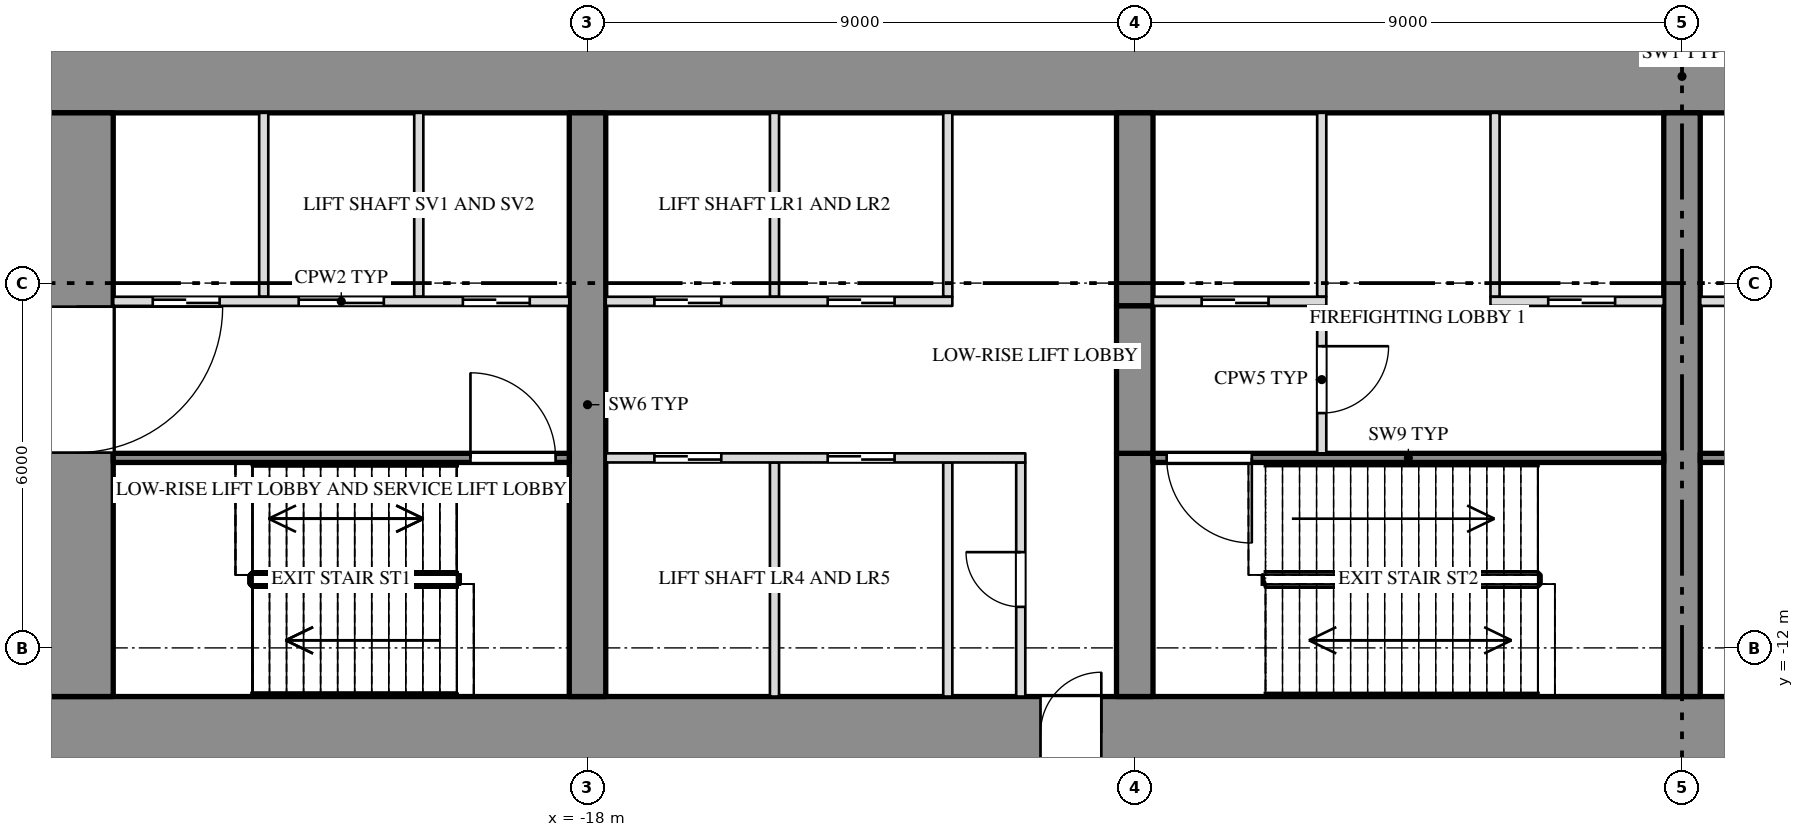
"""IFC4 building model, lengths in metres.
Left out: names, types, materials, properties, quantities, classifications, styles, units other than length and angle.
Written with IfcOpenShell. Run it as: python <this file> out.ifc"""

import sys

from ifc_helpers import new_model, si_unit, direction, frame, frame_2d, origin, place, context, subcontext, project, spatial, rectangle, extrude, element, fill, save


model = new_model("IFC4")
c1 = context("Model", 3, precision=1e-05, world=origin(), true_north=direction((0.0, 1.0)))
c2 = subcontext(c1, "Body", "Model", "MODEL_VIEW")
j1 = project(units=[si_unit("LENGTHUNIT", "METRE"), si_unit("PLANEANGLEUNIT", "RADIAN")], contexts=[c1])
p1 = place(None, origin())
s1 = spatial("IfcSite", under=j1, at=p1, CompositionType="ELEMENT")
p2 = place(p1, origin())
s2 = spatial("IfcBuilding", under=s1, at=p2, CompositionType="ELEMENT")
p3 = place(p2, frame((0.0, 0.0, 15.0)))
s3 = spatial("IfcBuildingStorey", under=s2, at=p3, CompositionType="ELEMENT", Elevation=15.0)
p4 = place(p3, frame((-27.0, -2.6, 0.0), z_axis=(0.0, 0.0, 1.0), x_axis=(1.0, 0.0, 0.0)))
e1 = element("IfcWall", 1, at=p4, inside=s3, PredefinedType="SHEAR", context=c2, shape_type="SweptSolid", body=[
    extrude(rectangle(XDim=54.0, YDim=1.2, at=frame_2d((27.0, 0.0))), origin(), (0.0, 0.0, 1.0), 5.7),
])
p5 = place(p3, frame((-27.0, -13.4, 0.0), z_axis=(0.0, 0.0, 1.0), x_axis=(1.0, 0.0, 0.0)))
e2 = element("IfcWall", 2, at=p5, inside=s3, PredefinedType="SHEAR", context=c2, shape_type="SweptSolid", body=[
    extrude(rectangle(XDim=54.0, YDim=1.2, at=frame_2d((27.0, 0.0))), origin(), (0.0, 0.0, 1.0), 5.7),
])
p6 = place(p5, frame((16.45, 0.0, 0.0)))
e3 = element("IfcOpeningElement", 3, at=p6, cuts=e2, PredefinedType="OPENING", context=c2, shape_type="SweptSolid", body=[
    extrude(rectangle(XDim=1.0, YDim=2.1, at=frame_2d((0.5, 1.05))), frame((0.0, 0.612, 0.0), z_axis=(0.0, -1.0, 0.0), x_axis=(1.0, 0.0, 0.0)), (0.0, 0.0, 1.0), 1.224),
])
p7 = place(p5, frame((36.55, 0.0, 0.0)))
e4 = element("IfcOpeningElement", 4, at=p7, cuts=e2, PredefinedType="OPENING", context=c2, shape_type="SweptSolid", body=[
    extrude(rectangle(XDim=1.0, YDim=2.1, at=frame_2d((0.5, 1.05))), frame((0.0, 0.612, 0.0), z_axis=(0.0, -1.0, 0.0), x_axis=(1.0, 0.0, 0.0)), (0.0, 0.0, 1.0), 1.224),
])
p8 = place(p3, frame((-26.4, -12.8, 0.0), z_axis=(0.0, 0.0, 1.0), x_axis=(0.0, 1.0, 0.0)))
e5 = element("IfcWall", 5, at=p8, inside=s3, PredefinedType="SHEAR", context=c2, shape_type="SweptSolid", body=[
    extrude(rectangle(XDim=9.6, YDim=1.2, at=frame_2d((4.8, 0.0))), origin(), (0.0, 0.0, 1.0), 5.7),
])
p9 = place(p8, frame((4.012, 0.0, 0.0)))
e6 = element("IfcOpeningElement", 6, at=p9, cuts=e5, PredefinedType="OPENING", context=c2, shape_type="SweptSolid", body=[
    extrude(rectangle(XDim=2.4, YDim=2.1, at=frame_2d((1.2, 1.05))), frame((0.0, 0.612, 0.0), z_axis=(0.0, -1.0, 0.0), x_axis=(1.0, 0.0, 0.0)), (0.0, 0.0, 1.0), 1.224),
])
p10 = place(p3, frame((-18.0, -12.8, 0.0), z_axis=(0.0, 0.0, 1.0), x_axis=(0.0, 1.0, 0.0)))
e7 = element("IfcWall", 7, at=p10, inside=s3, PredefinedType="SHEAR", context=c2, shape_type="SweptSolid", body=[
    extrude(rectangle(XDim=9.6, YDim=0.6, at=frame_2d((4.8, 0.0))), origin(), (0.0, 0.0, 1.0), 5.7),
])
p11 = place(p3, frame((-9.0, -12.8, 0.0), z_axis=(0.0, 0.0, 1.0), x_axis=(0.0, 1.0, 0.0)))
e8 = element("IfcWall", 8, at=p11, inside=s3, PredefinedType="SHEAR", context=c2, shape_type="SweptSolid", body=[
    extrude(rectangle(XDim=4.0, YDim=0.6, at=frame_2d((2.0, 0.0))), origin(), (0.0, 0.0, 1.0), 5.7),
])
p12 = place(p3, frame((-9.0, -6.375, 0.0), z_axis=(0.0, 0.0, 1.0), x_axis=(0.0, 1.0, 0.0)))
e9 = element("IfcWall", 9, at=p12, inside=s3, PredefinedType="SHEAR", context=c2, shape_type="SweptSolid", body=[
    extrude(rectangle(XDim=3.175, YDim=0.6, at=frame_2d((1.587, 0.0))), origin(), (0.0, 0.0, 1.0), 5.7),
])
p13 = place(p3, frame((-9.0, -8.8, 3.6), z_axis=(0.0, 0.0, 1.0), x_axis=(0.0, 1.0, 0.0)))
e10 = element("IfcWall", 10, at=p13, inside=s3, PredefinedType="SHEAR", context=c2, shape_type="SweptSolid", body=[
    extrude(rectangle(XDim=2.425, YDim=0.6, at=frame_2d((1.212, 0.0))), origin(), (0.0, 0.0, 1.0), 2.1),
])
p14 = place(p3, frame((0.0, -12.8, 0.0), z_axis=(0.0, 0.0, 1.0), x_axis=(0.0, 1.0, 0.0)))
e11 = element("IfcWall", 11, at=p14, inside=s3, PredefinedType="SHEAR", context=c2, shape_type="SweptSolid", body=[
    extrude(rectangle(XDim=9.6, YDim=0.6, at=frame_2d((4.8, 0.0))), origin(), (0.0, 0.0, 1.0), 5.7),
])
for number, where, z_axis, x_axis in (
    (12, (-20.775, -6.225, 0.0), (0.0, 0.0, 1.0), (0.0, 1.0, 0.0)),
    (13, (-23.325, -6.225, 0.0), (0.0, 0.0, 1.0), (0.0, 1.0, 0.0)),
    (14, (-12.075, -6.225, 0.0), (0.0, 0.0, 1.0), (0.0, 1.0, 0.0)),
    (15, (-14.925, -6.225, 0.0), (0.0, 0.0, 1.0), (0.0, 1.0, 0.0)),
    (16, (-3.075, -6.225, 0.0), (0.0, 0.0, 1.0), (0.0, 1.0, 0.0)),
    (17, (-5.925, -6.225, 0.0), (0.0, 0.0, 1.0), (0.0, 1.0, 0.0)),
):
    element("IfcWall", number, at=place(p3, frame(where, z_axis=z_axis, x_axis=x_axis)), inside=s3, PredefinedType="PARTITIONING", context=c2, shape_type="SweptSolid", body=[
        extrude(rectangle(XDim=3.025, YDim=0.15, at=frame_2d((1.513, 0.0))), origin(), (0.0, 0.0, 1.0), 5.7),
    ])
p15 = place(p3, frame((-10.875, -12.8, 0.0), z_axis=(0.0, 0.0, 1.0), x_axis=(0.0, 1.0, 0.0)))
e18 = element("IfcWall", 18, at=p15, inside=s3, PredefinedType="PARTITIONING", context=c2, shape_type="SweptSolid", body=[
    extrude(rectangle(XDim=3.85, YDim=0.15, at=frame_2d((1.925, 0.0))), origin(), (0.0, 0.0, 1.0), 5.7),
])
p16 = place(p15, frame((1.475, 0.0, 0.0)))
e19 = element("IfcOpeningElement", 19, at=p16, cuts=e18, PredefinedType="OPENING", context=c2, shape_type="SweptSolid", body=[
    extrude(rectangle(XDim=0.9, YDim=2.1, at=frame_2d((0.45, 1.05))), frame((0.0, 0.087, 0.0), z_axis=(0.0, -1.0, 0.0), x_axis=(1.0, 0.0, 0.0)), (0.0, 0.0, 1.0), 0.174),
])
for number, where, z_axis, x_axis in (
    (20, (-12.075, -12.8, 0.0), (0.0, 0.0, 1.0), (0.0, 1.0, 0.0)),
    (21, (-14.925, -12.8, 0.0), (0.0, 0.0, 1.0), (0.0, 1.0, 0.0)),
):
    element("IfcWall", number, at=place(p3, frame(where, z_axis=z_axis, x_axis=x_axis)), inside=s3, PredefinedType="PARTITIONING", context=c2, shape_type="SweptSolid", body=[
        extrude(rectangle(XDim=3.85, YDim=0.15, at=frame_2d((1.925, 0.0))), origin(), (0.0, 0.0, 1.0), 5.7),
    ])
p17 = place(p3, frame((-5.925, -8.8, 0.0), z_axis=(0.0, 0.0, 1.0), x_axis=(0.0, 1.0, 0.0)))
e22 = element("IfcWall", 22, at=p17, inside=s3, PredefinedType="PARTITIONING", context=c2, shape_type="SweptSolid", body=[
    extrude(rectangle(XDim=2.425, YDim=0.15, at=frame_2d((1.212, 0.0))), origin(), (0.0, 0.0, 1.0), 5.7),
])
p18 = place(p17, frame((0.662, 0.0, 0.0)))
e23 = element("IfcOpeningElement", 23, at=p18, cuts=e22, PredefinedType="OPENING", context=c2, shape_type="SweptSolid", body=[
    extrude(rectangle(XDim=1.1, YDim=2.1, at=frame_2d((0.55, 1.05))), frame((0.0, 0.087, 0.0), z_axis=(0.0, -1.0, 0.0), x_axis=(1.0, 0.0, 0.0)), (0.0, 0.0, 1.0), 0.174),
])
p19 = place(p3, frame((-25.8, -6.3, 0.0), z_axis=(0.0, 0.0, 1.0), x_axis=(1.0, 0.0, 0.0)))
e24 = element("IfcWall", 24, at=p19, inside=s3, PredefinedType="PARTITIONING", context=c2, shape_type="SweptSolid", body=[
    extrude(rectangle(XDim=7.5, YDim=0.15, at=frame_2d((3.75, 0.0))), origin(), (0.0, 0.0, 1.0), 5.7),
])
p20 = place(p19, frame((0.65, 0.0, 0.0)))
e25 = element("IfcOpeningElement", 25, at=p20, cuts=e24, PredefinedType="OPENING", context=c2, shape_type="SweptSolid", body=[
    extrude(rectangle(XDim=1.1, YDim=2.1, at=frame_2d((0.55, 1.05))), frame((0.0, 0.087, 0.0), z_axis=(0.0, -1.0, 0.0), x_axis=(1.0, 0.0, 0.0)), (0.0, 0.0, 1.0), 0.174),
])
p21 = place(p19, frame((3.05, 0.0, 0.0)))
e26 = element("IfcOpeningElement", 26, at=p21, cuts=e24, PredefinedType="OPENING", context=c2, shape_type="SweptSolid", body=[
    extrude(rectangle(XDim=1.4, YDim=2.1, at=frame_2d((0.7, 1.05))), frame((0.0, 0.087, 0.0), z_axis=(0.0, -1.0, 0.0), x_axis=(1.0, 0.0, 0.0)), (0.0, 0.0, 1.0), 0.174),
])
p22 = place(p19, frame((5.75, 0.0, 0.0)))
e27 = element("IfcOpeningElement", 27, at=p22, cuts=e24, PredefinedType="OPENING", context=c2, shape_type="SweptSolid", body=[
    extrude(rectangle(XDim=1.1, YDim=2.1, at=frame_2d((0.55, 1.05))), frame((0.0, 0.087, 0.0), z_axis=(0.0, -1.0, 0.0), x_axis=(1.0, 0.0, 0.0)), (0.0, 0.0, 1.0), 0.174),
])
p23 = place(p3, frame((-17.7, -6.3, 0.0), z_axis=(0.0, 0.0, 1.0), x_axis=(1.0, 0.0, 0.0)))
e28 = element("IfcWall", 28, at=p23, inside=s3, PredefinedType="PARTITIONING", context=c2, shape_type="SweptSolid", body=[
    extrude(rectangle(XDim=5.7, YDim=0.15, at=frame_2d((2.85, 0.0))), origin(), (0.0, 0.0, 1.0), 5.7),
])
p24 = place(p23, frame((0.8, 0.0, 0.0)))
e29 = element("IfcOpeningElement", 29, at=p24, cuts=e28, PredefinedType="OPENING", context=c2, shape_type="SweptSolid", body=[
    extrude(rectangle(XDim=1.1, YDim=2.1, at=frame_2d((0.55, 1.05))), frame((0.0, 0.087, 0.0), z_axis=(0.0, -1.0, 0.0), x_axis=(1.0, 0.0, 0.0)), (0.0, 0.0, 1.0), 0.174),
])
p25 = place(p23, frame((3.65, 0.0, 0.0)))
e30 = element("IfcOpeningElement", 30, at=p25, cuts=e28, PredefinedType="OPENING", context=c2, shape_type="SweptSolid", body=[
    extrude(rectangle(XDim=1.1, YDim=2.1, at=frame_2d((0.55, 1.05))), frame((0.0, 0.087, 0.0), z_axis=(0.0, -1.0, 0.0), x_axis=(1.0, 0.0, 0.0)), (0.0, 0.0, 1.0), 0.174),
])
p26 = place(p3, frame((-8.7, -6.3, 0.0), z_axis=(0.0, 0.0, 1.0), x_axis=(1.0, 0.0, 0.0)))
e31 = element("IfcWall", 31, at=p26, inside=s3, PredefinedType="PARTITIONING", context=c2, shape_type="SweptSolid", body=[
    extrude(rectangle(XDim=2.85, YDim=0.15, at=frame_2d((1.425, 0.0))), origin(), (0.0, 0.0, 1.0), 5.7),
])
p27 = place(p26, frame((0.8, 0.0, 0.0)))
e32 = element("IfcOpeningElement", 32, at=p27, cuts=e31, PredefinedType="OPENING", context=c2, shape_type="SweptSolid", body=[
    extrude(rectangle(XDim=1.1, YDim=2.1, at=frame_2d((0.55, 1.05))), frame((0.0, 0.087, 0.0), z_axis=(0.0, -1.0, 0.0), x_axis=(1.0, 0.0, 0.0)), (0.0, 0.0, 1.0), 0.174),
])
p28 = place(p3, frame((-3.15, -6.3, 0.0), z_axis=(0.0, 0.0, 1.0), x_axis=(1.0, 0.0, 0.0)))
e33 = element("IfcWall", 33, at=p28, inside=s3, PredefinedType="PARTITIONING", context=c2, shape_type="SweptSolid", body=[
    extrude(rectangle(XDim=2.85, YDim=0.15, at=frame_2d((1.425, 0.0))), origin(), (0.0, 0.0, 1.0), 5.7),
])
p29 = place(p28, frame((0.95, 0.0, 0.0)))
e34 = element("IfcOpeningElement", 34, at=p29, cuts=e33, PredefinedType="OPENING", context=c2, shape_type="SweptSolid", body=[
    extrude(rectangle(XDim=1.1, YDim=2.1, at=frame_2d((0.55, 1.05))), frame((0.0, 0.087, 0.0), z_axis=(0.0, -1.0, 0.0), x_axis=(1.0, 0.0, 0.0)), (0.0, 0.0, 1.0), 0.174),
])
p30 = place(p3, frame((0.3, -6.3, 0.0), z_axis=(0.0, 0.0, 1.0), x_axis=(1.0, 0.0, 0.0)))
e35 = element("IfcWall", 35, at=p30, inside=s3, PredefinedType="PARTITIONING", context=c2, shape_type="SweptSolid", body=[
    extrude(rectangle(XDim=2.85, YDim=0.15, at=frame_2d((1.425, 0.0))), origin(), (0.0, 0.0, 1.0), 5.7),
])
p31 = place(p30, frame((0.8, 0.0, 0.0)))
e36 = element("IfcOpeningElement", 36, at=p31, cuts=e35, PredefinedType="OPENING", context=c2, shape_type="SweptSolid", body=[
    extrude(rectangle(XDim=1.1, YDim=2.1, at=frame_2d((0.55, 1.05))), frame((0.0, 0.087, 0.0), z_axis=(0.0, -1.0, 0.0), x_axis=(1.0, 0.0, 0.0)), (0.0, 0.0, 1.0), 0.174),
])
p32 = place(p3, frame((-25.8, -8.875, 0.0), z_axis=(0.0, 0.0, 1.0), x_axis=(1.0, 0.0, 0.0)))
e37 = element("IfcWall", 37, at=p32, inside=s3, PredefinedType="SHEAR", context=c2, shape_type="SweptSolid", body=[
    extrude(rectangle(XDim=7.5, YDim=0.15, at=frame_2d((3.75, 0.0))), origin(), (0.0, 0.0, 1.0), 5.7),
])
p33 = place(p32, frame((5.875, 0.0, 0.0)))
e38 = element("IfcOpeningElement", 38, at=p33, cuts=e37, PredefinedType="OPENING", context=c2, shape_type="SweptSolid", body=[
    extrude(rectangle(XDim=1.4, YDim=2.1, at=frame_2d((0.7, 1.05))), frame((0.0, 0.087, 0.0), z_axis=(0.0, -1.0, 0.0), x_axis=(1.0, 0.0, 0.0)), (0.0, 0.0, 1.0), 0.174),
])
p34 = place(p3, frame((-17.7, -8.875, 0.0), z_axis=(0.0, 0.0, 1.0), x_axis=(1.0, 0.0, 0.0)))
e39 = element("IfcWall", 39, at=p34, inside=s3, PredefinedType="PARTITIONING", context=c2, shape_type="SweptSolid", body=[
    extrude(rectangle(XDim=6.9, YDim=0.15, at=frame_2d((3.45, 0.0))), origin(), (0.0, 0.0, 1.0), 5.7),
])
p35 = place(p34, frame((0.8, 0.0, 0.0)))
e40 = element("IfcOpeningElement", 40, at=p35, cuts=e39, PredefinedType="OPENING", context=c2, shape_type="SweptSolid", body=[
    extrude(rectangle(XDim=1.1, YDim=2.1, at=frame_2d((0.55, 1.05))), frame((0.0, 0.087, 0.0), z_axis=(0.0, -1.0, 0.0), x_axis=(1.0, 0.0, 0.0)), (0.0, 0.0, 1.0), 0.174),
])
p36 = place(p34, frame((3.65, 0.0, 0.0)))
e41 = element("IfcOpeningElement", 41, at=p36, cuts=e39, PredefinedType="OPENING", context=c2, shape_type="SweptSolid", body=[
    extrude(rectangle(XDim=1.1, YDim=2.1, at=frame_2d((0.55, 1.05))), frame((0.0, 0.087, 0.0), z_axis=(0.0, -1.0, 0.0), x_axis=(1.0, 0.0, 0.0)), (0.0, 0.0, 1.0), 0.174),
])
p37 = place(p3, frame((-8.7, -8.875, 0.0), z_axis=(0.0, 0.0, 1.0), x_axis=(1.0, 0.0, 0.0)))
e42 = element("IfcWall", 42, at=p37, inside=s3, PredefinedType="SHEAR", context=c2, shape_type="SweptSolid", body=[
    extrude(rectangle(XDim=8.4, YDim=0.15, at=frame_2d((4.2, 0.0))), origin(), (0.0, 0.0, 1.0), 5.7),
])
p38 = place(p37, frame((0.225, 0.0, 0.0)))
e43 = element("IfcOpeningElement", 43, at=p38, cuts=e42, PredefinedType="OPENING", context=c2, shape_type="SweptSolid", body=[
    extrude(rectangle(XDim=1.4, YDim=2.1, at=frame_2d((0.7, 1.05))), frame((0.0, 0.087, 0.0), z_axis=(0.0, -1.0, 0.0), x_axis=(1.0, 0.0, 0.0)), (0.0, 0.0, 1.0), 0.174),
])
p39 = place(p3, frame((0.3, -8.875, 0.0), z_axis=(0.0, 0.0, 1.0), x_axis=(1.0, 0.0, 0.0)))
e44 = element("IfcWall", 44, at=p39, inside=s3, PredefinedType="SHEAR", context=c2, shape_type="SweptSolid", body=[
    extrude(rectangle(XDim=8.4, YDim=0.15, at=frame_2d((4.2, 0.0))), origin(), (0.0, 0.0, 1.0), 5.7),
])
p40 = place(p39, frame((6.775, 0.0, 0.0)))
e45 = element("IfcOpeningElement", 45, at=p40, cuts=e44, PredefinedType="OPENING", context=c2, shape_type="SweptSolid", body=[
    extrude(rectangle(XDim=1.4, YDim=2.1, at=frame_2d((0.7, 1.05))), frame((0.0, 0.087, 0.0), z_axis=(0.0, -1.0, 0.0), x_axis=(1.0, 0.0, 0.0)), (0.0, 0.0, 1.0), 0.174),
])
p41 = place(p9, origin())
e46 = element("IfcDoor", 46, at=p41, inside=s3, OperationType="DOUBLE_DOOR_SINGLE_SWING", PredefinedType="DOOR", context=c2, shape_type="SweptSolid", body=[
    extrude(rectangle(XDim=2.4, YDim=2.1, at=frame_2d((1.2, 1.05))), frame((0.0, 0.025, 0.0), z_axis=(0.0, -1.0, 0.0), x_axis=(1.0, 0.0, 0.0)), (0.0, 0.0, 1.0), 0.05),
])
fill(e6, e46)
p42 = place(p20, origin())
e47 = element("IfcDoor", 47, at=p42, inside=s3, OperationType="SLIDING_TO_RIGHT", PredefinedType="DOOR", context=c2, shape_type="SweptSolid", body=[
    extrude(rectangle(XDim=1.1, YDim=2.1, at=frame_2d((0.55, 1.05))), frame((0.0, 0.025, 0.0), z_axis=(0.0, -1.0, 0.0), x_axis=(1.0, 0.0, 0.0)), (0.0, 0.0, 1.0), 0.05),
])
fill(e25, e47)
p43 = place(p21, origin())
e48 = element("IfcDoor", 48, at=p43, inside=s3, OperationType="SLIDING_TO_LEFT", PredefinedType="DOOR", context=c2, shape_type="SweptSolid", body=[
    extrude(rectangle(XDim=1.4, YDim=2.1, at=frame_2d((0.7, 1.05))), frame((0.0, 0.025, 0.0), z_axis=(0.0, -1.0, 0.0), x_axis=(1.0, 0.0, 0.0)), (0.0, 0.0, 1.0), 0.05),
])
fill(e26, e48)
p44 = place(p22, origin())
e49 = element("IfcDoor", 49, at=p44, inside=s3, OperationType="SLIDING_TO_RIGHT", PredefinedType="DOOR", context=c2, shape_type="SweptSolid", body=[
    extrude(rectangle(XDim=1.1, YDim=2.1, at=frame_2d((0.55, 1.05))), frame((0.0, 0.025, 0.0), z_axis=(0.0, -1.0, 0.0), x_axis=(1.0, 0.0, 0.0)), (0.0, 0.0, 1.0), 0.05),
])
fill(e27, e49)
p45 = place(p33, origin())
e50 = element("IfcDoor", 50, at=p45, inside=s3, OperationType="DOUBLE_DOOR_SINGLE_SWING", PredefinedType="DOOR", context=c2, shape_type="SweptSolid", body=[
    extrude(rectangle(XDim=1.4, YDim=2.1, at=frame_2d((0.7, 1.05))), frame((0.0, 0.025, 0.0), z_axis=(0.0, -1.0, 0.0), x_axis=(1.0, 0.0, 0.0)), (0.0, 0.0, 1.0), 0.05),
])
fill(e38, e50)
p46 = place(p35, origin())
e51 = element("IfcDoor", 51, at=p46, inside=s3, OperationType="SLIDING_TO_RIGHT", PredefinedType="DOOR", context=c2, shape_type="SweptSolid", body=[
    extrude(rectangle(XDim=1.1, YDim=2.1, at=frame_2d((0.55, 1.05))), frame((0.0, 0.025, 0.0), z_axis=(0.0, -1.0, 0.0), x_axis=(1.0, 0.0, 0.0)), (0.0, 0.0, 1.0), 0.05),
])
fill(e40, e51)
p47 = place(p24, origin())
e52 = element("IfcDoor", 52, at=p47, inside=s3, OperationType="SLIDING_TO_LEFT", PredefinedType="DOOR", context=c2, shape_type="SweptSolid", body=[
    extrude(rectangle(XDim=1.1, YDim=2.1, at=frame_2d((0.55, 1.05))), frame((0.0, 0.025, 0.0), z_axis=(0.0, -1.0, 0.0), x_axis=(1.0, 0.0, 0.0)), (0.0, 0.0, 1.0), 0.05),
])
fill(e29, e52)
p48 = place(p36, origin())
e53 = element("IfcDoor", 53, at=p48, inside=s3, OperationType="SLIDING_TO_RIGHT", PredefinedType="DOOR", context=c2, shape_type="SweptSolid", body=[
    extrude(rectangle(XDim=1.1, YDim=2.1, at=frame_2d((0.55, 1.05))), frame((0.0, 0.025, 0.0), z_axis=(0.0, -1.0, 0.0), x_axis=(1.0, 0.0, 0.0)), (0.0, 0.0, 1.0), 0.05),
])
fill(e41, e53)
p49 = place(p25, origin())
e54 = element("IfcDoor", 54, at=p49, inside=s3, OperationType="SLIDING_TO_LEFT", PredefinedType="DOOR", context=c2, shape_type="SweptSolid", body=[
    extrude(rectangle(XDim=1.1, YDim=2.1, at=frame_2d((0.55, 1.05))), frame((0.0, 0.025, 0.0), z_axis=(0.0, -1.0, 0.0), x_axis=(1.0, 0.0, 0.0)), (0.0, 0.0, 1.0), 0.05),
])
fill(e30, e54)
p50 = place(p16, origin())
e55 = element("IfcDoor", 55, at=p50, inside=s3, OperationType="SINGLE_SWING_RIGHT", PredefinedType="DOOR", context=c2, shape_type="SweptSolid", body=[
    extrude(rectangle(XDim=0.9, YDim=2.1, at=frame_2d((0.45, 1.05))), frame((0.0, 0.025, 0.0), z_axis=(0.0, -1.0, 0.0), x_axis=(1.0, 0.0, 0.0)), (0.0, 0.0, 1.0), 0.05),
])
fill(e19, e55)
p51 = place(p6, origin())
e56 = element("IfcDoor", 56, at=p51, inside=s3, OperationType="SINGLE_SWING_RIGHT", PredefinedType="DOOR", context=c2, shape_type="SweptSolid", body=[
    extrude(rectangle(XDim=1.0, YDim=2.1, at=frame_2d((0.5, 1.05))), frame((0.0, 0.025, 0.0), z_axis=(0.0, -1.0, 0.0), x_axis=(1.0, 0.0, 0.0)), (0.0, 0.0, 1.0), 0.05),
])
fill(e3, e56)
p52 = place(p38, origin())
e57 = element("IfcDoor", 57, at=p52, inside=s3, OperationType="DOUBLE_DOOR_SINGLE_SWING", PredefinedType="DOOR", context=c2, shape_type="SweptSolid", body=[
    extrude(rectangle(XDim=1.4, YDim=2.1, at=frame_2d((0.7, 1.05))), frame((0.0, 0.025, 0.0), z_axis=(0.0, -1.0, 0.0), x_axis=(1.0, 0.0, 0.0)), (0.0, 0.0, 1.0), 0.05),
])
fill(e43, e57)
p53 = place(p27, origin())
e58 = element("IfcDoor", 58, at=p53, inside=s3, OperationType="SLIDING_TO_LEFT", PredefinedType="DOOR", context=c2, shape_type="SweptSolid", body=[
    extrude(rectangle(XDim=1.1, YDim=2.1, at=frame_2d((0.55, 1.05))), frame((0.0, 0.025, 0.0), z_axis=(0.0, -1.0, 0.0), x_axis=(1.0, 0.0, 0.0)), (0.0, 0.0, 1.0), 0.05),
])
fill(e32, e58)
p54 = place(p18, origin())
e59 = element("IfcDoor", 59, at=p54, inside=s3, OperationType="SINGLE_SWING_LEFT", PredefinedType="DOOR", context=c2, shape_type="SweptSolid", body=[
    extrude(rectangle(XDim=1.1, YDim=2.1, at=frame_2d((0.55, 1.05))), frame((0.0, 0.025, 0.0), z_axis=(0.0, -1.0, 0.0), x_axis=(1.0, 0.0, 0.0)), (0.0, 0.0, 1.0), 0.05),
])
fill(e23, e59)
p55 = place(p29, origin())
e60 = element("IfcDoor", 60, at=p55, inside=s3, OperationType="SLIDING_TO_LEFT", PredefinedType="DOOR", context=c2, shape_type="SweptSolid", body=[
    extrude(rectangle(XDim=1.1, YDim=2.1, at=frame_2d((0.55, 1.05))), frame((0.0, 0.025, 0.0), z_axis=(0.0, -1.0, 0.0), x_axis=(1.0, 0.0, 0.0)), (0.0, 0.0, 1.0), 0.05),
])
fill(e34, e60)
save(model, sys.argv[1])
